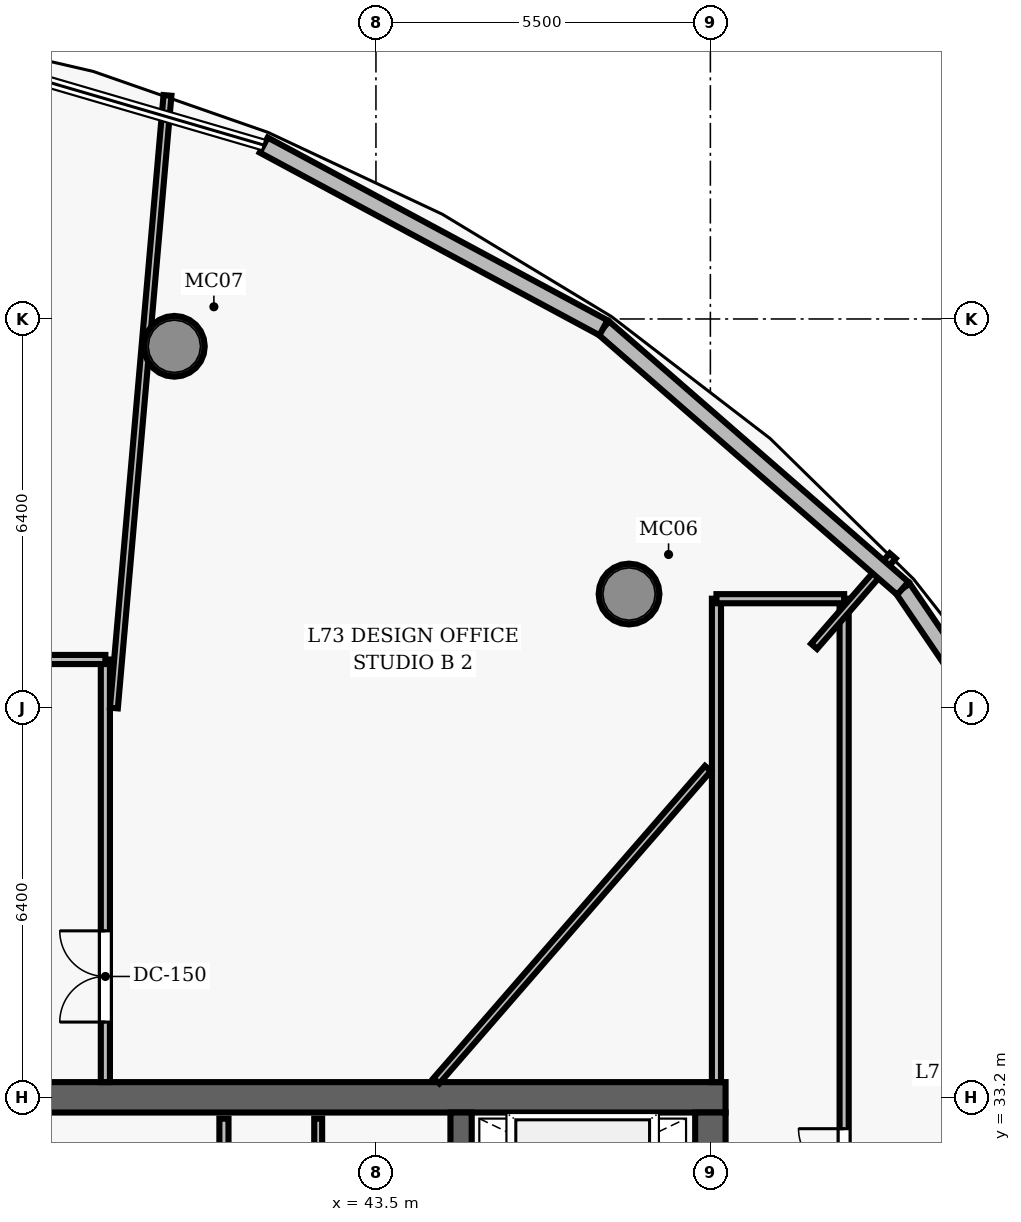
"""IFC4 building model, lengths in metres.
Left out: names, types, materials, properties, quantities, classifications, styles, units other than length and angle.
Written with IfcOpenShell. Run it as: python <this file> out.ifc"""

import sys

from ifc_helpers import new_model, si_unit, direction, frame, frame_2d, origin, origin_2d, place, context, subcontext, project, spatial, rectangle, hollow_circle, extrude, element, fill, save


model = new_model("IFC4")
c1 = context("Model", 3, precision=1e-05, world=origin(), true_north=direction((0.0, 1.0)))
c2 = subcontext(c1, "Body", "Model", "MODEL_VIEW")
j1 = project(units=[si_unit("LENGTHUNIT", "METRE"), si_unit("PLANEANGLEUNIT", "RADIAN")], contexts=[c1])
p1 = place(None, origin())
s1 = spatial("IfcSite", under=j1, at=p1, CompositionType="ELEMENT")
p2 = place(p1, origin())
s2 = spatial("IfcBuilding", under=s1, at=p2, CompositionType="ELEMENT")
p3 = place(p2, frame((0.0, 0.0, 288.25)))
s3 = spatial("IfcBuildingStorey", under=s2, at=p3, CompositionType="ELEMENT", Elevation=288.25)
p4 = place(p3, frame((26.75, 33.2, 0.0), z_axis=(0.0, 0.0, 1.0), x_axis=(1.0, 0.0, 0.0)))
e1 = element("IfcWall", 1, at=p4, inside=s3, PredefinedType="SHEAR", context=c2, shape_type="SweptSolid", body=[
    extrude(rectangle(XDim=22.5, YDim=0.5, at=frame_2d((11.25, 0.0))), origin(), (0.0, 0.0, 1.0), 3.85),
])
p5 = place(p3, frame((49.0, 19.05, 0.0), z_axis=(0.0, 0.0, 1.0), x_axis=(0.0, 1.0, 0.0)))
e2 = element("IfcWall", 2, at=p5, inside=s3, PredefinedType="SHEAR", context=c2, shape_type="SweptSolid", body=[
    extrude(rectangle(XDim=13.9, YDim=0.5, at=frame_2d((6.95, 0.0))), origin(), (0.0, 0.0, 1.0), 3.85),
])
p6 = place(p5, frame((8.2, 0.0, 0.0)))
e3 = element("IfcOpeningElement", 3, at=p6, cuts=e2, PredefinedType="OPENING", context=c2, shape_type="SweptSolid", body=[
    extrude(rectangle(XDim=1.05, YDim=2.15, at=frame_2d((0.525, 1.075))), frame((0.0, 0.26, 0.0), z_axis=(0.0, -1.0, 0.0), x_axis=(1.0, 0.0, 0.0)), (0.0, 0.0, 1.0), 0.52),
])
p7 = place(p3, frame((44.9, 19.05, 0.0), z_axis=(0.0, 0.0, 1.0), x_axis=(0.0, 1.0, 0.0)))
e4 = element("IfcWall", 4, at=p7, inside=s3, PredefinedType="SHEAR", context=c2, shape_type="SweptSolid", body=[
    extrude(rectangle(XDim=13.9, YDim=0.35, at=frame_2d((6.95, 0.0))), origin(), (0.0, 0.0, 1.0), 3.85),
])
for number, where, z_axis, x_axis in (
    (5, (47.662, 41.477, 0.0), (0.0, 0.0, 1.0), (1.0, 0.0, 0.0)),
    (6, (40.185, 45.551, 0.0), (0.0, 0.0, 1.0), (1.0, 0.0, 0.0)),
):
    element("IfcColumn", number, at=place(p3, frame(where, z_axis=z_axis, x_axis=x_axis)), inside=s3, PredefinedType="COLUMN", context=c2, shape_type="SweptSolid", body=[
        extrude(hollow_circle(Radius=0.5, WallThickness=0.045, at=origin_2d()), origin(), (0.0, 0.0, 1.0), 3.85),
    ])
p8 = place(p3, frame((41.0, 28.95, 0.0), z_axis=(0.0, 0.0, 1.0), x_axis=(0.0, 1.0, 0.0)))
e7 = element("IfcWall", 7, at=p8, inside=s3, PredefinedType="PARTITIONING", context=c2, shape_type="SweptSolid", body=[
    extrude(rectangle(XDim=3.9, YDim=0.15, at=frame_2d((1.95, 0.0))), origin(), (0.0, 0.0, 1.0), 3.04),
])
p9 = place(p8, frame((0.7, 0.0, 0.0)))
e8 = element("IfcOpeningElement", 8, at=p9, cuts=e7, PredefinedType="OPENING", context=c2, shape_type="SweptSolid", body=[
    extrude(rectangle(XDim=0.85, YDim=2.1, at=frame_2d((0.425, 1.05))), frame((0.0, 0.085, 0.0), z_axis=(0.0, -1.0, 0.0), x_axis=(1.0, 0.0, 0.0)), (0.0, 0.0, 1.0), 0.17),
])
p10 = place(p3, frame((42.55, 28.1, 0.0), z_axis=(0.0, 0.0, 1.0), x_axis=(0.0, 1.0, 0.0)))
e9 = element("IfcWall", 9, at=p10, inside=s3, PredefinedType="PARTITIONING", context=c2, shape_type="SweptSolid", body=[
    extrude(rectangle(XDim=4.75, YDim=0.13, at=frame_2d((2.375, 0.0))), origin(), (0.0, 0.0, 1.0), 3.04),
])
p11 = place(p10, frame((1.4, 0.0, 0.0)))
e10 = element("IfcOpeningElement", 10, at=p11, cuts=e9, PredefinedType="OPENING", context=c2, shape_type="SweptSolid", body=[
    extrude(rectangle(XDim=0.85, YDim=2.1, at=frame_2d((0.425, 1.05))), frame((0.0, 0.075, 0.0), z_axis=(0.0, -1.0, 0.0), x_axis=(1.0, 0.0, 0.0)), (0.0, 0.0, 1.0), 0.15),
])
p12 = place(p3, frame((51.2, 10.6, 0.0), z_axis=(0.0, 0.0, 1.0), x_axis=(0.0, 1.0, 0.0)))
e11 = element("IfcWall", 11, at=p12, inside=s3, PredefinedType="PARTITIONING", context=c2, shape_type="SweptSolid", body=[
    extrude(rectangle(XDim=30.8, YDim=0.15, at=frame_2d((15.4, 0.0))), origin(), (0.0, 0.0, 1.0), 3.04),
])
p13 = place(p12, frame((20.584, 0.0, 0.0)))
e12 = element("IfcOpeningElement", 12, at=p13, cuts=e11, PredefinedType="OPENING", context=c2, shape_type="SweptSolid", body=[
    extrude(rectangle(XDim=1.5, YDim=2.2, at=frame_2d((0.75, 1.1))), frame((0.0, 0.085, 0.0), z_axis=(0.0, -1.0, 0.0), x_axis=(1.0, 0.0, 0.0)), (0.0, 0.0, 1.0), 0.17),
])
p14 = place(p12, frame((11.03, 0.0, 0.0)))
e13 = element("IfcOpeningElement", 13, at=p14, cuts=e11, PredefinedType="OPENING", context=c2, shape_type="SweptSolid", body=[
    extrude(rectangle(XDim=1.5, YDim=2.2, at=frame_2d((0.75, 1.1))), frame((0.0, 0.085, 0.0), z_axis=(0.0, -1.0, 0.0), x_axis=(1.0, 0.0, 0.0)), (0.0, 0.0, 1.0), 0.17),
])
p15 = place(p3, frame((49.1, 33.45, 0.0), z_axis=(0.0, 0.0, 1.0), x_axis=(0.0, 1.0, 0.0)))
e14 = element("IfcWall", 14, at=p15, inside=s3, PredefinedType="PARTITIONING", context=c2, shape_type="SweptSolid", body=[
    extrude(rectangle(XDim=7.95, YDim=0.15, at=frame_2d((3.975, 0.0))), origin(), (0.0, 0.0, 1.0), 3.04),
])
p16 = place(p3, frame((49.1, 41.4, 0.0), z_axis=(0.0, 0.0, 1.0), x_axis=(1.0, 0.0, 0.0)))
e15 = element("IfcWall", 15, at=p16, inside=s3, PredefinedType="PARTITIONING", context=c2, shape_type="SweptSolid", body=[
    extrude(rectangle(XDim=2.1, YDim=0.15, at=frame_2d((1.05, 0.0))), origin(), (0.0, 0.0, 1.0), 3.04),
])
p17 = place(p3, frame((39.05, 33.45, 0.0), z_axis=(0.0, 0.0, 1.0), x_axis=(0.0, 1.0, 0.0)))
e16 = element("IfcWall", 16, at=p17, inside=s3, PredefinedType="PARTITIONING", context=c2, shape_type="SweptSolid", body=[
    extrude(rectangle(XDim=6.95, YDim=0.15, at=frame_2d((3.475, 0.0))), origin(), (0.0, 0.0, 1.0), 3.04),
])
p18 = place(p17, frame((0.988, 0.0, 0.0)))
e17 = element("IfcOpeningElement", 17, at=p18, cuts=e16, PredefinedType="OPENING", context=c2, shape_type="SweptSolid", body=[
    extrude(rectangle(XDim=1.5, YDim=2.2, at=frame_2d((0.75, 1.1))), frame((0.0, 0.085, 0.0), z_axis=(0.0, -1.0, 0.0), x_axis=(1.0, 0.0, 0.0)), (0.0, 0.0, 1.0), 0.17),
])
p19 = place(p3, frame((36.95, 40.4, 0.0), z_axis=(0.0, 0.0, 1.0), x_axis=(1.0, 0.0, 0.0)))
e18 = element("IfcWall", 18, at=p19, inside=s3, PredefinedType="PARTITIONING", context=c2, shape_type="SweptSolid", body=[
    extrude(rectangle(XDim=2.1, YDim=0.15, at=frame_2d((1.05, 0.0))), origin(), (0.0, 0.0, 1.0), 3.04),
])
p20 = place(p3, frame((44.494, 33.47, 0.0), z_axis=(0.0, 0.0, 1.0), x_axis=(0.656056181598, 0.754712055414, 0.0)))
e19 = element("IfcWall", 19, at=p20, inside=s3, PredefinedType="PARTITIONING", context=c2, shape_type="SweptSolid", body=[
    extrude(rectangle(XDim=6.808, YDim=0.13, at=frame_2d((3.404, 0.0))), origin(), (0.0, 0.0, 1.0), 3.04),
])
p21 = place(p3, frame((50.706, 40.616, 0.0), z_axis=(0.0, 0.0, 1.0), x_axis=(0.656009996887, 0.754752200384, 0.0)))
e20 = element("IfcWall", 20, at=p21, inside=s3, PredefinedType="PARTITIONING", context=c2, shape_type="SweptSolid", body=[
    extrude(rectangle(XDim=1.971, YDim=0.13, at=frame_2d((0.985, 0.0))), origin(), (0.0, 0.0, 1.0), 3.04),
])
p22 = place(p3, frame((39.19, 39.602, 0.0), z_axis=(0.0, 0.0, 1.0), x_axis=(0.087146287499, 0.996195525274, 0.0)))
e21 = element("IfcWall", 21, at=p22, inside=s3, PredefinedType="PARTITIONING", context=c2, shape_type="SweptSolid", body=[
    extrude(rectangle(XDim=10.114, YDim=0.13, at=frame_2d((5.057, 0.0))), origin(), (0.0, 0.0, 1.0), 3.04),
])
p23 = place(p3, frame((52.164, 41.57, 0.0), z_axis=(0.0, 0.0, 1.0), x_axis=(0.562539179248, -0.826770628295, 0.0)))
e22 = element("IfcWall", 22, at=p23, inside=s3, PredefinedType="SOLIDWALL", context=c2, shape_type="SweptSolid", body=[
    extrude(rectangle(XDim=6.527, YDim=0.28, at=frame_2d((3.263, 0.0))), origin(), (0.0, 0.0, 1.0), 3.625),
])
p24 = place(p3, frame((47.242, 45.855, 0.0), z_axis=(0.0, 0.0, 1.0), x_axis=(0.754222031982, -0.656619468546, 0.0)))
e23 = element("IfcWall", 23, at=p24, inside=s3, PredefinedType="SOLIDWALL", context=c2, shape_type="SweptSolid", body=[
    extrude(rectangle(XDim=6.526, YDim=0.28, at=frame_2d((3.263, 0.0))), origin(), (0.0, 0.0, 1.0), 3.625),
])
p25 = place(p3, frame((41.654, 48.861, 0.0), z_axis=(0.0, 0.0, 1.0), x_axis=(0.880702024307, -0.473670713029, 0.0)))
e24 = element("IfcWall", 24, at=p25, inside=s3, PredefinedType="SOLIDWALL", context=c2, shape_type="SweptSolid", body=[
    extrude(rectangle(XDim=6.345, YDim=0.28, at=frame_2d((3.173, 0.0))), origin(), (0.0, 0.0, 1.0), 3.625),
])
p26 = place(p13, origin())
e25 = element("IfcDoor", 25, at=p26, inside=s3, OperationType="DOUBLE_DOOR_SINGLE_SWING", PredefinedType="DOOR", context=c2, shape_type="SweptSolid", body=[
    extrude(rectangle(XDim=1.5, YDim=2.2, at=frame_2d((0.75, 1.1))), frame((0.0, 0.025, 0.0), z_axis=(0.0, -1.0, 0.0), x_axis=(1.0, 0.0, 0.0)), (0.0, 0.0, 1.0), 0.05),
])
fill(e12, e25)
p27 = place(p18, origin())
e26 = element("IfcDoor", 26, at=p27, inside=s3, OperationType="DOUBLE_DOOR_SINGLE_SWING", PredefinedType="DOOR", context=c2, shape_type="SweptSolid", body=[
    extrude(rectangle(XDim=1.5, YDim=2.2, at=frame_2d((0.75, 1.1))), frame((0.0, 0.025, 0.0), z_axis=(0.0, -1.0, 0.0), x_axis=(1.0, 0.0, 0.0)), (0.0, 0.0, 1.0), 0.05),
])
fill(e17, e26)
save(model, sys.argv[1])
